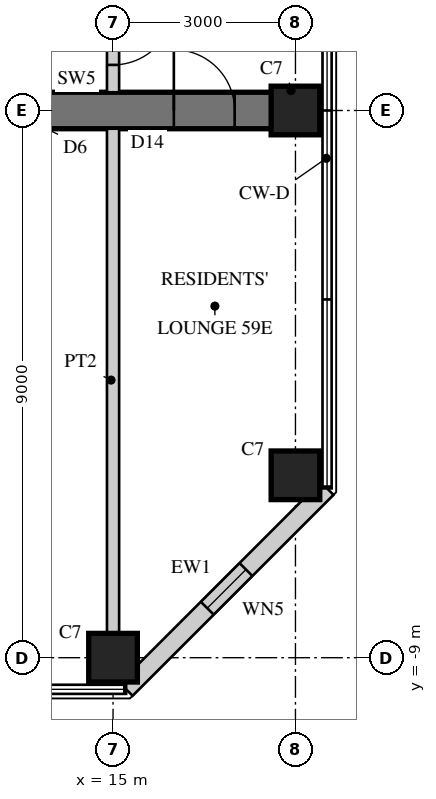
"""IFC4 building model, lengths in metres.
Left out: names, types, materials, properties, quantities, classifications, styles, units other than length and angle.
Written with IfcOpenShell. Run it as: python <this file> out.ifc"""

import sys

from ifc_helpers import new_model, si_unit, direction, frame, frame_2d, origin, origin_2d, place, context, subcontext, project, spatial, rectangle, hollow_rectangle, extrude, element, fill, save


model = new_model("IFC4")
c1 = context("Model", 3, precision=1e-05, world=origin(), true_north=direction((0.0, 1.0)))
c2 = subcontext(c1, "Body", "Model", "MODEL_VIEW")
j1 = project(units=[si_unit("LENGTHUNIT", "METRE"), si_unit("PLANEANGLEUNIT", "RADIAN")], contexts=[c1])
p1 = place(None, origin())
s1 = spatial("IfcSite", under=j1, at=p1, CompositionType="ELEMENT")
p2 = place(p1, origin())
s2 = spatial("IfcBuilding", under=s1, at=p2, CompositionType="ELEMENT")
p3 = place(p2, frame((0.0, 0.0, 232.3)))
s3 = spatial("IfcBuildingStorey", under=s2, at=p3, CompositionType="ELEMENT", Elevation=232.3)
p4 = place(p3, frame((9.0, 0.0, 0.0), z_axis=(0.0, 0.0, 1.0), x_axis=(1.0, 0.0, 0.0)))
e1 = element("IfcWall", 1, at=p4, inside=s3, PredefinedType="SHEAR", context=c2, shape_type="SweptSolid", body=[
    extrude(rectangle(XDim=9.0, YDim=0.6, at=frame_2d((4.5, 0.0))), origin(), (0.0, 0.0, 1.0), 3.4),
])
p5 = place(p4, frame((3.8, 0.0, 0.0)))
e2 = element("IfcOpeningElement", 2, at=p5, cuts=e1, PredefinedType="OPENING", context=c2, shape_type="SweptSolid", body=[
    extrude(rectangle(XDim=1.0, YDim=2.15, at=frame_2d((0.5, 1.075))), frame((0.0, 0.31, 0.0), z_axis=(0.0, -1.0, 0.0), x_axis=(1.0, 0.0, 0.0)), (0.0, 0.0, 1.0), 0.62),
])
p6 = place(p4, frame((7.0, 0.0, 0.0)))
e3 = element("IfcOpeningElement", 3, at=p6, cuts=e1, PredefinedType="OPENING", context=c2, shape_type="SweptSolid", body=[
    extrude(rectangle(XDim=1.0, YDim=2.2, at=frame_2d((0.5, 1.1))), frame((0.0, 0.31, 0.0), z_axis=(0.0, -1.0, 0.0), x_axis=(1.0, 0.0, 0.0)), (0.0, 0.0, 1.0), 0.62),
])
for number, where, z_axis, x_axis in (
    (4, (15.0, -9.0, 0.0), (0.0, 0.0, 1.0), (1.0, 0.0, 0.0)),
    (5, (18.0, -6.0, 0.0), (0.0, 0.0, 1.0), (1.0, 0.0, 0.0)),
    (6, (18.0, 0.0, 0.0), (0.0, 0.0, 1.0), (1.0, 0.0, 0.0)),
):
    element("IfcColumn", number, at=place(p3, frame(where, z_axis=z_axis, x_axis=x_axis)), inside=s3, PredefinedType="COLUMN", context=c2, shape_type="SweptSolid", body=[
        extrude(rectangle(XDim=0.8, YDim=0.8, at=origin_2d()), origin(), (0.0, 0.0, 1.0), 3.4),
    ])
p7 = place(p3, frame((15.215, -9.52, 0.0), z_axis=(0.0, 0.0, 1.0), x_axis=(0.707106781187, 0.707106781187, 0.0)))
e7 = element("IfcWall", 7, at=p7, inside=s3, PredefinedType="SOLIDWALL", context=c2, shape_type="SweptSolid", body=[
    extrude(rectangle(XDim=4.674, YDim=0.3, at=frame_2d((2.337, 0.0))), origin(), (0.0, 0.0, 1.0), 3.22),
])
p8 = place(p7, frame((1.887, 0.0, 0.3)))
e8 = element("IfcOpeningElement", 8, at=p8, cuts=e7, PredefinedType="OPENING", context=c2, shape_type="SweptSolid", body=[
    extrude(rectangle(XDim=0.9, YDim=2.4, at=frame_2d((0.45, 1.2))), frame((0.0, 0.16, 0.0), z_axis=(0.0, -1.0, 0.0), x_axis=(1.0, 0.0, 0.0)), (0.0, 0.0, 1.0), 0.32),
])
p9 = place(p3, frame((15.0, -8.6, 0.0), z_axis=(0.0, 0.0, 1.0), x_axis=(0.0, 1.0, 0.0)))
e9 = element("IfcWall", 9, at=p9, inside=s3, PredefinedType="SOLIDWALL", context=c2, shape_type="SweptSolid", body=[
    extrude(rectangle(XDim=8.3, YDim=0.2, at=frame_2d((4.15, 0.0))), origin(), (0.0, 0.0, 1.0), 2.52),
])
p10 = place(p3, frame((15.0, 0.3, 0.0), z_axis=(0.0, 0.0, 1.0), x_axis=(0.0, 1.0, 0.0)))
e10 = element("IfcWall", 10, at=p10, inside=s3, PredefinedType="SOLIDWALL", context=c2, shape_type="SweptSolid", body=[
    extrude(rectangle(XDim=8.3, YDim=0.2, at=frame_2d((4.15, 0.0))), origin(), (0.0, 0.0, 1.0), 2.52),
])
p11 = place(p10, frame((0.45, 0.0, 0.0)))
e11 = element("IfcOpeningElement", 11, at=p11, cuts=e10, PredefinedType="OPENING", context=c2, shape_type="SweptSolid", body=[
    extrude(rectangle(XDim=1.0, YDim=2.2, at=frame_2d((0.5, 1.1))), frame((0.0, 0.11, 0.0), z_axis=(0.0, -1.0, 0.0), x_axis=(1.0, 0.0, 0.0)), (0.0, 0.0, 1.0), 0.22),
])
p12 = place(p8, origin())
e12 = element("IfcWindow", 12, at=p12, inside=s3, PartitioningType="SINGLE_PANEL", PredefinedType="WINDOW", context=c2, shape_type="SweptSolid", body=[
    extrude(hollow_rectangle(XDim=0.9, YDim=2.4, WallThickness=0.06, at=frame_2d((0.45, 1.2))), frame((0.0, 0.03, 0.0), z_axis=(0.0, -1.0, 0.0), x_axis=(1.0, 0.0, 0.0)), (0.0, 0.0, 1.0), 0.06),
    extrude(rectangle(XDim=0.779, YDim=2.279, at=frame_2d((0.45, 1.2))), frame((0.0, 0.03, 0.0), z_axis=(0.0, -1.0, 0.0), x_axis=(1.0, 0.0, 0.0)), (0.0, 0.0, 1.0), 0.06),
])
fill(e8, e12)
p13 = place(p11, frame((1.0, 0.0, 0.0), z_axis=(0.0, 0.0, 1.0), x_axis=(-1.0, 0.0, 0.0)))
e13 = element("IfcDoor", 13, at=p13, inside=s3, OperationType="SINGLE_SWING_LEFT", PredefinedType="DOOR", context=c2, shape_type="SweptSolid", body=[
    extrude(rectangle(XDim=1.0, YDim=2.2, at=frame_2d((0.5, 1.1))), frame((0.0, 0.025, 0.0), z_axis=(0.0, -1.0, 0.0), x_axis=(1.0, 0.0, 0.0)), (0.0, 0.0, 1.0), 0.05),
])
fill(e11, e13)
p14 = place(p6, origin())
e14 = element("IfcDoor", 14, at=p14, inside=s3, OperationType="SINGLE_SWING_LEFT", PredefinedType="DOOR", context=c2, shape_type="SweptSolid", body=[
    extrude(rectangle(XDim=1.0, YDim=2.2, at=frame_2d((0.5, 1.1))), frame((0.0, 0.025, 0.0), z_axis=(0.0, -1.0, 0.0), x_axis=(1.0, 0.0, 0.0)), (0.0, 0.0, 1.0), 0.05),
])
fill(e3, e14)
save(model, sys.argv[1])
